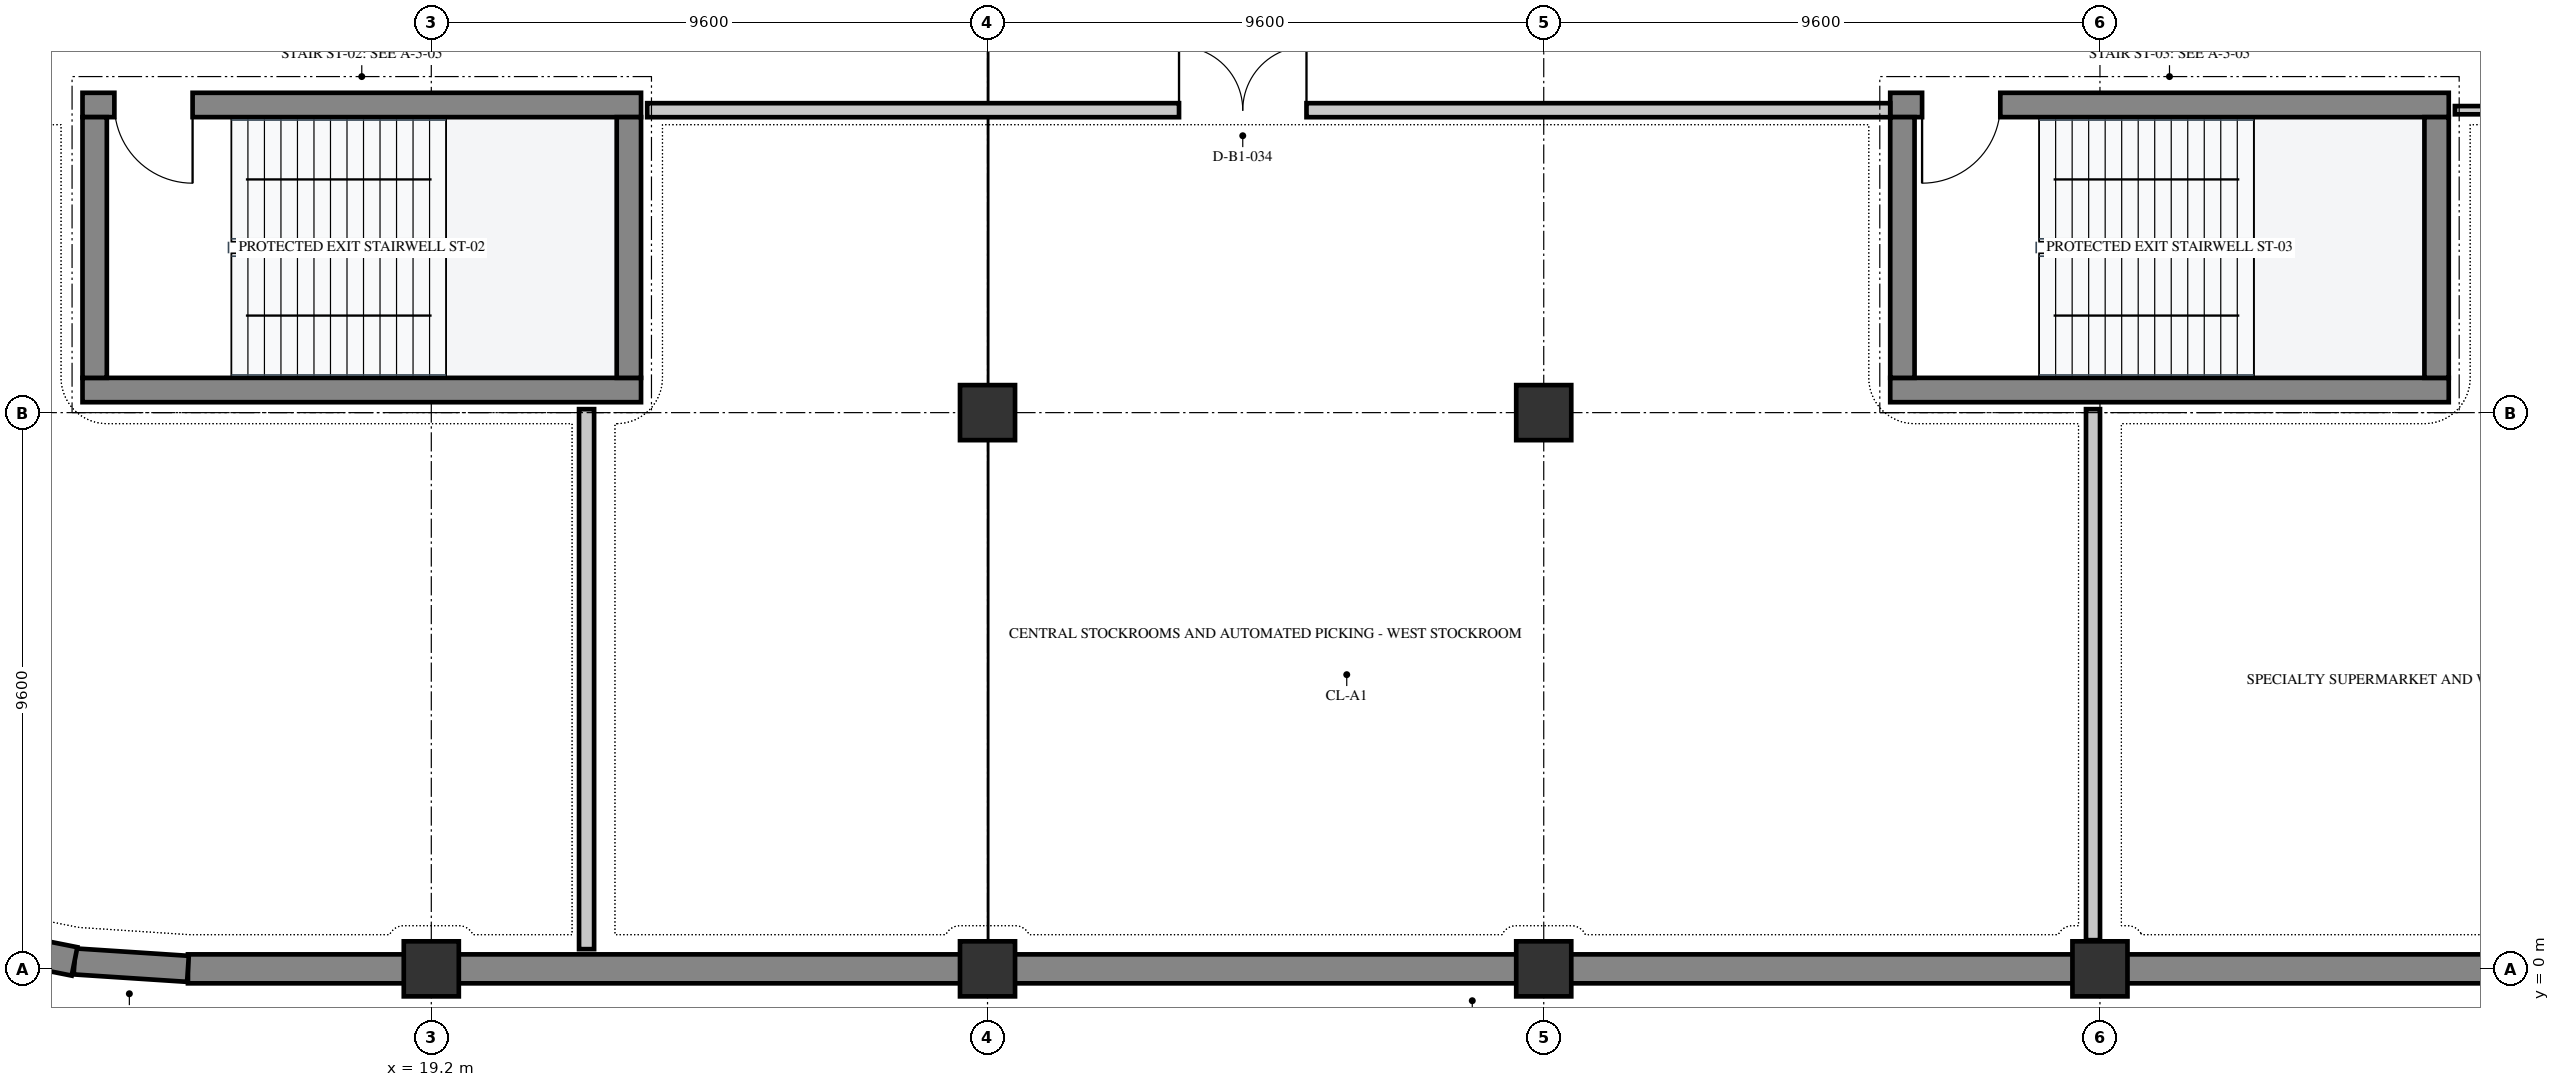
"""IFC4 building model, lengths in metres.
Left out: names, types, materials, properties, quantities, classifications, styles, units other than length and angle.
Written with IfcOpenShell. Run it as: python <this file> out.ifc"""

import sys

from ifc_helpers import new_model, si_unit, direction, frame, frame_2d, origin, origin_2d, place, context, subcontext, project, spatial, rectangle, extrude, element, fill, save


model = new_model("IFC4")
c1 = context("Model", 3, precision=1e-05, world=origin(), true_north=direction((0.0, 1.0)))
c2 = subcontext(c1, "Body", "Model", "MODEL_VIEW")
j1 = project(units=[si_unit("LENGTHUNIT", "METRE"), si_unit("PLANEANGLEUNIT", "RADIAN")], contexts=[c1])
p1 = place(None, origin())
s1 = spatial("IfcSite", under=j1, at=p1, CompositionType="ELEMENT")
p2 = place(p1, origin())
s2 = spatial("IfcBuilding", under=s1, at=p2, CompositionType="ELEMENT")
p3 = place(p2, frame((0.0, 0.0, -4.8)))
s3 = spatial("IfcBuildingStorey", under=s2, at=p3, CompositionType="ELEMENT", Elevation=-4.8)
for number, where, z_axis, x_axis in (
    (1, (19.2, 0.0, 0.0), (0.0, 0.0, 1.0), (1.0, 0.0, 0.0)),
    (2, (28.8, 0.0, 0.0), (0.0, 0.0, 1.0), (1.0, 0.0, 0.0)),
    (3, (28.8, 9.6, 0.0), (0.0, 0.0, 1.0), (1.0, 0.0, 0.0)),
    (4, (38.4, 0.0, 0.0), (0.0, 0.0, 1.0), (1.0, 0.0, 0.0)),
    (5, (38.4, 9.6, 0.0), (0.0, 0.0, 1.0), (1.0, 0.0, 0.0)),
    (6, (48.0, 0.0, 0.0), (0.0, 0.0, 1.0), (1.0, 0.0, 0.0)),
):
    element("IfcColumn", number, at=place(p3, frame(where, z_axis=z_axis, x_axis=x_axis)), inside=s3, PredefinedType="COLUMN", context=c2, shape_type="SweptSolid", body=[
        extrude(rectangle(XDim=0.95, YDim=0.95, at=origin_2d()), origin(), (0.0, 0.0, 1.0), 4.8),
    ])
p4 = place(p3, frame((67.2, 0.0, 0.0), z_axis=(0.0, 0.0, 1.0), x_axis=(-1.0, 0.0, 0.0)))
e7 = element("IfcWall", 7, at=p4, inside=s3, PredefinedType="USERDEFINED", context=c2, shape_type="SweptSolid", body=[
    extrude(rectangle(XDim=52.2, YDim=0.5, at=frame_2d((26.1, 0.0))), origin(), (0.0, 0.0, 1.0), 4.5),
])
p5 = place(p3, frame((15.0, 0.0, 0.0), z_axis=(0.0, 0.0, 1.0), x_axis=(-0.997856149912, 0.065445428286, 0.0)))
e8 = element("IfcWall", 8, at=p5, inside=s3, PredefinedType="USERDEFINED", context=c2, shape_type="SweptSolid", body=[
    extrude(rectangle(XDim=1.962, YDim=0.45, at=frame_2d((0.981, 0.0))), origin(), (0.0, 0.0, 1.0), 4.5),
])
p6 = place(p3, frame((13.042, 0.128, 0.0), z_axis=(0.0, 0.0, 1.0), x_axis=(-0.980804972775, 0.194991295653, 0.0)))
e9 = element("IfcWall", 9, at=p6, inside=s3, PredefinedType="USERDEFINED", context=c2, shape_type="SweptSolid", body=[
    extrude(rectangle(XDim=1.962, YDim=0.5, at=frame_2d((0.981, 0.0))), origin(), (0.0, 0.0, 1.0), 4.5),
])
p7 = place(p3, frame((13.18, 9.99, 0.0), z_axis=(0.0, 0.0, 1.0), x_axis=(1.0, 0.0, 0.0)))
e10 = element("IfcWall", 10, at=p7, inside=s3, PredefinedType="SHEAR", context=c2, shape_type="SweptSolid", body=[
    extrude(rectangle(XDim=9.64, YDim=0.42, at=frame_2d((4.82, 0.0))), origin(), (0.0, 0.0, 1.0), 4.5),
])
p8 = place(p3, frame((13.18, 14.91, 0.0), z_axis=(0.0, 0.0, 1.0), x_axis=(1.0, 0.0, 0.0)))
e11 = element("IfcWall", 11, at=p8, inside=s3, PredefinedType="SHEAR", context=c2, shape_type="SweptSolid", body=[
    extrude(rectangle(XDim=9.64, YDim=0.42, at=frame_2d((4.82, 0.0))), origin(), (0.0, 0.0, 1.0), 4.5),
])
p9 = place(p8, frame((0.55, 0.0, 0.0)))
e12 = element("IfcOpeningElement", 12, at=p9, cuts=e11, PredefinedType="OPENING", context=c2, shape_type="SweptSolid", body=[
    extrude(rectangle(XDim=1.35, YDim=2.2, at=frame_2d((0.675, 1.1))), frame((0.0, 0.222, 0.0), z_axis=(0.0, -1.0, 0.0), x_axis=(1.0, 0.0, 0.0)), (0.0, 0.0, 1.0), 0.444),
])
for number, where, z_axis, x_axis in (
    (13, (22.61, 10.2, 0.0), (0.0, 0.0, 1.0), (0.0, 1.0, 0.0)),
    (14, (13.39, 10.2, 0.0), (0.0, 0.0, 1.0), (0.0, 1.0, 0.0)),
):
    element("IfcWall", number, at=place(p3, frame(where, z_axis=z_axis, x_axis=x_axis)), inside=s3, PredefinedType="SHEAR", context=c2, shape_type="SweptSolid", body=[
        extrude(rectangle(XDim=4.5, YDim=0.42, at=frame_2d((2.25, 0.0))), origin(), (0.0, 0.0, 1.0), 4.5),
    ])
p10 = place(p3, frame((44.38, 9.99, 0.0), z_axis=(0.0, 0.0, 1.0), x_axis=(1.0, 0.0, 0.0)))
e15 = element("IfcWall", 15, at=p10, inside=s3, PredefinedType="SHEAR", context=c2, shape_type="SweptSolid", body=[
    extrude(rectangle(XDim=9.64, YDim=0.42, at=frame_2d((4.82, 0.0))), origin(), (0.0, 0.0, 1.0), 4.5),
])
p11 = place(p3, frame((44.38, 14.91, 0.0), z_axis=(0.0, 0.0, 1.0), x_axis=(1.0, 0.0, 0.0)))
e16 = element("IfcWall", 16, at=p11, inside=s3, PredefinedType="SHEAR", context=c2, shape_type="SweptSolid", body=[
    extrude(rectangle(XDim=9.64, YDim=0.42, at=frame_2d((4.82, 0.0))), origin(), (0.0, 0.0, 1.0), 4.5),
])
p12 = place(p11, frame((0.55, 0.0, 0.0)))
e17 = element("IfcOpeningElement", 17, at=p12, cuts=e16, PredefinedType="OPENING", context=c2, shape_type="SweptSolid", body=[
    extrude(rectangle(XDim=1.35, YDim=2.2, at=frame_2d((0.675, 1.1))), frame((0.0, 0.222, 0.0), z_axis=(0.0, -1.0, 0.0), x_axis=(1.0, 0.0, 0.0)), (0.0, 0.0, 1.0), 0.444),
])
for number, where, z_axis, x_axis in (
    (18, (53.81, 10.2, 0.0), (0.0, 0.0, 1.0), (0.0, 1.0, 0.0)),
    (19, (44.59, 10.2, 0.0), (0.0, 0.0, 1.0), (0.0, 1.0, 0.0)),
):
    element("IfcWall", number, at=place(p3, frame(where, z_axis=z_axis, x_axis=x_axis)), inside=s3, PredefinedType="SHEAR", context=c2, shape_type="SweptSolid", body=[
        extrude(rectangle(XDim=4.5, YDim=0.42, at=frame_2d((2.25, 0.0))), origin(), (0.0, 0.0, 1.0), 4.5),
    ])
p13 = place(p3, frame((21.88, 9.66, 0.0), z_axis=(0.0, 0.0, 1.0), x_axis=(0.0, -1.0, 0.0)))
e20 = element("IfcWall", 20, at=p13, inside=s3, PredefinedType="PARTITIONING", context=c2, shape_type="SweptSolid", body=[
    extrude(rectangle(XDim=9.32, YDim=0.26, at=frame_2d((4.66, 0.0))), origin(), (0.0, 0.0, 1.0), 4.5),
])
p14 = place(p3, frame((22.926, 14.82, 0.0), z_axis=(0.0, 0.0, 1.0), x_axis=(1.0, 0.0, 0.0)))
e21 = element("IfcWall", 21, at=p14, inside=s3, PredefinedType="PARTITIONING", context=c2, shape_type="SweptSolid", body=[
    extrude(rectangle(XDim=21.454, YDim=0.242, at=frame_2d((10.727, 0.0))), origin(), (0.0, 0.0, 1.0), 3.44),
])
p15 = place(p14, frame((9.179, 0.0, 0.0)))
e22 = element("IfcOpeningElement", 22, at=p15, cuts=e21, PredefinedType="OPENING", context=c2, shape_type="SweptSolid", body=[
    extrude(rectangle(XDim=2.2, YDim=2.5, at=frame_2d((1.1, 1.25))), frame((0.0, 0.133, 0.0), z_axis=(0.0, -1.0, 0.0), x_axis=(1.0, 0.0, 0.0)), (0.0, 0.0, 1.0), 0.266),
])
p16 = place(p3, frame((47.88, 9.66, 0.0), z_axis=(0.0, 0.0, 1.0), x_axis=(0.0, -1.0, 0.0)))
e23 = element("IfcWall", 23, at=p16, inside=s3, PredefinedType="PARTITIONING", context=c2, shape_type="SweptSolid", body=[
    extrude(rectangle(XDim=9.165, YDim=0.242, at=frame_2d((4.583, 0.0))), origin(), (0.0, 0.0, 1.0), 4.5),
])
p17 = place(p3, frame((54.126, 14.82, 0.0), z_axis=(0.0, 0.0, 1.0), x_axis=(1.0, 0.0, 0.0)))
e24 = element("IfcWall", 24, at=p17, inside=s3, PredefinedType="PARTITIONING", context=c2, shape_type="SweptSolid", body=[
    extrude(rectangle(XDim=12.954, YDim=0.142, at=frame_2d((6.477, 0.0))), origin(), (0.0, 0.0, 1.0), 3.44),
])
p18 = place(p17, frame((5.517, 0.0, 0.0)))
e25 = element("IfcOpeningElement", 25, at=p18, cuts=e24, PredefinedType="OPENING", context=c2, shape_type="SweptSolid", body=[
    extrude(rectangle(XDim=1.92, YDim=2.38, at=frame_2d((0.96, 1.19))), frame((0.0, 0.083, 0.0), z_axis=(0.0, -1.0, 0.0), x_axis=(1.0, 0.0, 0.0)), (0.0, 0.0, 1.0), 0.166),
])
p19 = place(p9, frame((1.35, 0.0, 0.0), z_axis=(0.0, 0.0, 1.0), x_axis=(-1.0, 0.0, 0.0)))
e26 = element("IfcDoor", 26, at=p19, inside=s3, OperationType="SINGLE_SWING_LEFT", PredefinedType="DOOR", context=c2, shape_type="SweptSolid", body=[
    extrude(rectangle(XDim=1.35, YDim=2.2, at=frame_2d((0.675, 1.1))), frame((0.0, 0.025, 0.0), z_axis=(0.0, -1.0, 0.0), x_axis=(1.0, 0.0, 0.0)), (0.0, 0.0, 1.0), 0.05),
])
fill(e12, e26)
p20 = place(p12, frame((1.35, 0.0, 0.0), z_axis=(0.0, 0.0, 1.0), x_axis=(-1.0, 0.0, 0.0)))
e27 = element("IfcDoor", 27, at=p20, inside=s3, OperationType="SINGLE_SWING_RIGHT", PredefinedType="DOOR", context=c2, shape_type="SweptSolid", body=[
    extrude(rectangle(XDim=1.35, YDim=2.2, at=frame_2d((0.675, 1.1))), frame((0.0, 0.025, 0.0), z_axis=(0.0, -1.0, 0.0), x_axis=(1.0, 0.0, 0.0)), (0.0, 0.0, 1.0), 0.05),
])
fill(e17, e27)
p21 = place(p15, origin())
e28 = element("IfcDoor", 28, at=p21, inside=s3, OperationType="DOUBLE_DOOR_SINGLE_SWING", PredefinedType="DOOR", context=c2, shape_type="SweptSolid", body=[
    extrude(rectangle(XDim=2.2, YDim=2.5, at=frame_2d((1.1, 1.25))), frame((0.0, 0.025, 0.0), z_axis=(0.0, -1.0, 0.0), x_axis=(1.0, 0.0, 0.0)), (0.0, 0.0, 1.0), 0.05),
])
fill(e22, e28)
save(model, sys.argv[1])
